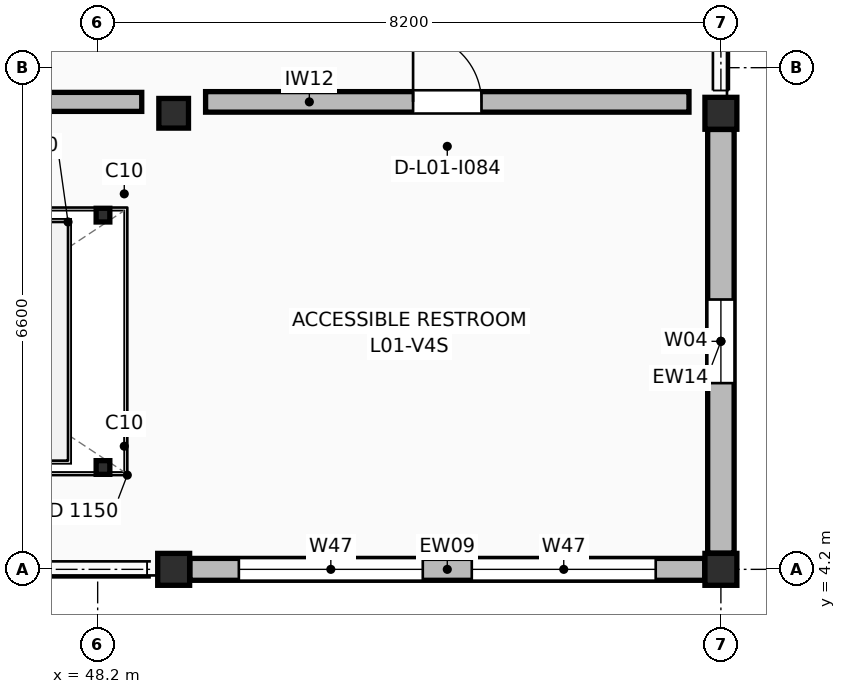
"""IFC4 building model, lengths in metres.
Left out: names, types, materials, properties, quantities, classifications, styles, units other than length and angle.
Written with IfcOpenShell. Run it as: python <this file> out.ifc"""

import sys

from ifc_helpers import new_model, si_unit, direction, frame, frame_2d, origin, origin_2d, place, context, subcontext, project, spatial, rectangle, hollow_rectangle, extrude, element, fill, save


model = new_model("IFC4")
c1 = context("Model", 3, precision=1e-05, world=origin(), true_north=direction((0.0, 1.0)))
c2 = subcontext(c1, "Body", "Model", "MODEL_VIEW")
j1 = project(units=[si_unit("LENGTHUNIT", "METRE"), si_unit("PLANEANGLEUNIT", "RADIAN")], contexts=[c1])
p1 = place(None, origin())
s1 = spatial("IfcSite", under=j1, at=p1, CompositionType="ELEMENT")
p2 = place(p1, origin())
s2 = spatial("IfcBuilding", under=s1, at=p2, CompositionType="ELEMENT")
p3 = place(p2, frame((0.0, 0.0, 4.42)))
s3 = spatial("IfcBuildingStorey", under=s2, at=p3, CompositionType="ELEMENT", Elevation=4.42)
p4 = place(p3, frame((49.2, 4.2, 0.0), z_axis=(0.0, 0.0, 1.0), x_axis=(1.0, 0.0, 0.0)))
e1 = element("IfcColumn", 1, at=p4, inside=s3, PredefinedType="COLUMN", context=c2, shape_type="SweptSolid", body=[
    extrude(rectangle(XDim=0.42, YDim=0.42, at=origin_2d()), origin(), (0.0, 0.0, 1.0), 3.74),
])
p5 = place(p3, frame((49.2, 10.2, 0.0), z_axis=(0.0, 0.0, 1.0), x_axis=(1.0, 0.0, 0.0)))
e2 = element("IfcColumn", 2, at=p5, inside=s3, PredefinedType="COLUMN", context=c2, shape_type="SweptSolid", body=[
    extrude(rectangle(XDim=0.39, YDim=0.39, at=origin_2d()), origin(), (0.0, 0.0, 1.0), 3.74),
])
for number, where, z_axis, x_axis in (
    (3, (56.4, 4.2, 0.0), (0.0, 0.0, 1.0), (1.0, 0.0, 0.0)),
    (4, (56.4, 10.2, 0.0), (0.0, 0.0, 1.0), (1.0, 0.0, 0.0)),
):
    element("IfcColumn", number, at=place(p3, frame(where, z_axis=z_axis, x_axis=x_axis)), inside=s3, PredefinedType="COLUMN", context=c2, shape_type="SweptSolid", body=[
        extrude(rectangle(XDim=0.42, YDim=0.42, at=origin_2d()), origin(), (0.0, 0.0, 1.0), 3.74),
    ])
p6 = place(p3, frame((49.413, 4.2, 0.0), z_axis=(0.0, 0.0, 1.0), x_axis=(1.0, 0.0, 0.0)))
e5 = element("IfcWall", 5, at=p6, inside=s3, PredefinedType="STANDARD", context=c2, shape_type="SweptSolid", body=[
    extrude(rectangle(XDim=6.774, YDim=0.288, at=frame_2d((3.387, 0.0))), origin(), (0.0, 0.0, 1.0), 2.78),
])
p7 = place(p6, frame((0.645, 0.0, 0.95)))
e6 = element("IfcOpeningElement", 6, at=p7, cuts=e5, PredefinedType="OPENING", context=c2, shape_type="SweptSolid", body=[
    extrude(rectangle(XDim=2.42, YDim=1.45, at=frame_2d((1.21, 0.725))), frame((0.0, 0.154, 0.0), z_axis=(0.0, -1.0, 0.0), x_axis=(1.0, 0.0, 0.0)), (0.0, 0.0, 1.0), 0.308),
])
p8 = place(p6, frame((3.709, 0.0, 0.95)))
e7 = element("IfcOpeningElement", 7, at=p8, cuts=e5, PredefinedType="OPENING", context=c2, shape_type="SweptSolid", body=[
    extrude(rectangle(XDim=2.42, YDim=1.45, at=frame_2d((1.21, 0.725))), frame((0.0, 0.154, 0.0), z_axis=(0.0, -1.0, 0.0), x_axis=(1.0, 0.0, 0.0)), (0.0, 0.0, 1.0), 0.308),
])
p9 = place(p3, frame((56.4, 4.413, 0.0), z_axis=(0.0, 0.0, 1.0), x_axis=(0.0, 1.0, 0.0)))
e8 = element("IfcWall", 8, at=p9, inside=s3, PredefinedType="STANDARD", context=c2, shape_type="SweptSolid", body=[
    extrude(rectangle(XDim=5.574, YDim=0.348, at=frame_2d((2.787, 0.0))), origin(), (0.0, 0.0, 1.0), 2.78),
])
p10 = place(p9, frame((2.237, 0.0, 0.95)))
e9 = element("IfcOpeningElement", 9, at=p10, cuts=e8, PredefinedType="OPENING", context=c2, shape_type="SweptSolid", body=[
    extrude(rectangle(XDim=1.1, YDim=1.6, at=frame_2d((0.55, 0.8))), frame((0.0, 0.184, 0.0), z_axis=(0.0, -1.0, 0.0), x_axis=(1.0, 0.0, 0.0)), (0.0, 0.0, 1.0), 0.368),
])
for number, where, z_axis, x_axis in (
    (10, (48.27, 5.54, 0.0), (0.0, 0.0, 1.0), (1.0, 0.0, 0.0)),
    (11, (48.27, 8.86, 0.0), (0.0, 0.0, 1.0), (1.0, 0.0, 0.0)),
):
    element("IfcColumn", number, at=place(p3, frame(where, z_axis=z_axis, x_axis=x_axis)), inside=s3, PredefinedType="COLUMN", context=c2, shape_type="SweptSolid", body=[
        extrude(hollow_rectangle(XDim=0.18, YDim=0.18, WallThickness=0.01, InnerFilletRadius=0.01, OuterFilletRadius=0.02, at=origin_2d()), origin(), (0.0, 0.0, 1.0), 1.675),
    ])
p11 = place(p3, frame((41.72, 10.35, 0.0), z_axis=(0.0, 0.0, 1.0), x_axis=(1.0, 0.0, 0.0)))
e12 = element("IfcWall", 12, at=p11, inside=s3, PredefinedType="STANDARD", context=c2, shape_type="SweptSolid", body=[
    extrude(rectangle(XDim=7.06, YDim=0.25, at=frame_2d((3.53, 0.0))), origin(), (0.0, 0.0, 1.0), 2.75),
])
p12 = place(p3, frame((49.62, 10.35, 0.0), z_axis=(0.0, 0.0, 1.0), x_axis=(1.0, 0.0, 0.0)))
e13 = element("IfcWall", 13, at=p12, inside=s3, PredefinedType="STANDARD", context=c2, shape_type="SweptSolid", body=[
    extrude(rectangle(XDim=6.36, YDim=0.27, at=frame_2d((3.18, 0.0))), origin(), (0.0, 0.0, 1.0), 2.75),
])
p13 = place(p12, frame((2.73, 0.0, 0.0)))
e14 = element("IfcOpeningElement", 14, at=p13, cuts=e13, PredefinedType="OPENING", context=c2, shape_type="SweptSolid", body=[
    extrude(rectangle(XDim=0.9, YDim=2.06, at=frame_2d((0.45, 1.03))), frame((0.0, 0.145, 0.0), z_axis=(0.0, -1.0, 0.0), x_axis=(1.0, 0.0, 0.0)), (0.0, 0.0, 1.0), 0.29),
])
p14 = place(p7, origin())
e15 = element("IfcWindow", 15, at=p14, inside=s3, PartitioningType="SINGLE_PANEL", PredefinedType="WINDOW", context=c2, shape_type="SweptSolid", body=[
    extrude(rectangle(XDim=2.42, YDim=1.45, at=frame_2d((1.21, 0.725))), frame((0.0, 0.03, 0.0), z_axis=(0.0, -1.0, 0.0), x_axis=(1.0, 0.0, 0.0)), (0.0, 0.0, 1.0), 0.06),
])
fill(e6, e15)
p15 = place(p8, origin())
e16 = element("IfcWindow", 16, at=p15, inside=s3, PartitioningType="SINGLE_PANEL", PredefinedType="WINDOW", context=c2, shape_type="SweptSolid", body=[
    extrude(rectangle(XDim=2.42, YDim=1.45, at=frame_2d((1.21, 0.725))), frame((0.0, 0.03, 0.0), z_axis=(0.0, -1.0, 0.0), x_axis=(1.0, 0.0, 0.0)), (0.0, 0.0, 1.0), 0.06),
])
fill(e7, e16)
p16 = place(p10, origin())
e17 = element("IfcWindow", 17, at=p16, inside=s3, PartitioningType="SINGLE_PANEL", PredefinedType="WINDOW", context=c2, shape_type="SweptSolid", body=[
    extrude(rectangle(XDim=1.1, YDim=1.6, at=frame_2d((0.55, 0.8))), frame((0.0, 0.03, 0.0), z_axis=(0.0, -1.0, 0.0), x_axis=(1.0, 0.0, 0.0)), (0.0, 0.0, 1.0), 0.06),
])
fill(e9, e17)
p17 = place(p13, origin())
e18 = element("IfcDoor", 18, at=p17, inside=s3, OperationType="SINGLE_SWING_LEFT", PredefinedType="DOOR", context=c2, shape_type="SweptSolid", body=[
    extrude(rectangle(XDim=0.9, YDim=2.06, at=frame_2d((0.45, 1.03))), frame((0.0, 0.025, 0.0), z_axis=(0.0, -1.0, 0.0), x_axis=(1.0, 0.0, 0.0)), (0.0, 0.0, 1.0), 0.05),
])
fill(e14, e18)
save(model, sys.argv[1])
